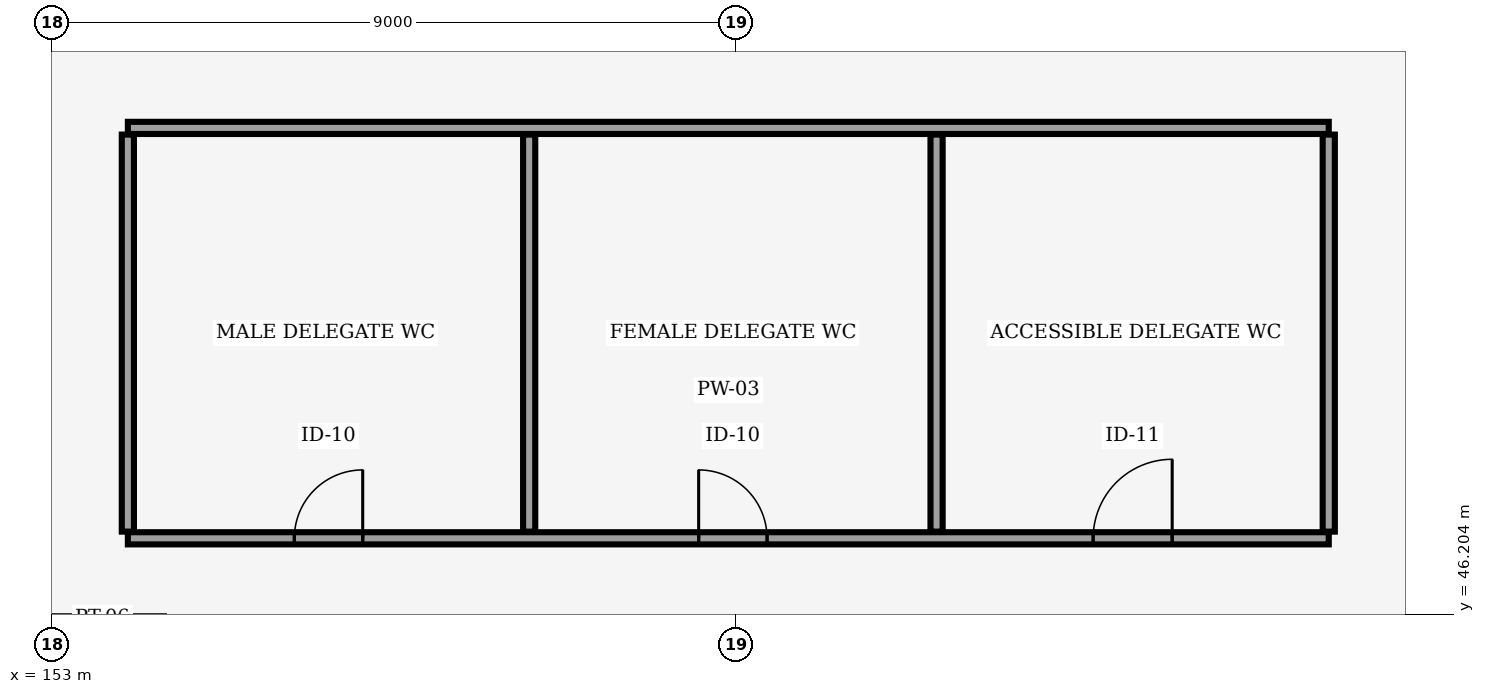
"""IFC4 building model, lengths in metres.
Left out: names, types, materials, properties, quantities, classifications, styles, units other than length and angle.
Written with IfcOpenShell. Run it as: python <this file> out.ifc"""

import sys

from ifc_helpers import new_model, si_unit, direction, frame, frame_2d, origin, place, context, subcontext, project, spatial, rectangle, extrude, element, fill, save


model = new_model("IFC4")
c1 = context("Model", 3, precision=1e-05, world=origin(), true_north=direction((0.0, 1.0)))
c2 = subcontext(c1, "Body", "Model", "MODEL_VIEW")
j1 = project(units=[si_unit("LENGTHUNIT", "METRE"), si_unit("PLANEANGLEUNIT", "RADIAN")], contexts=[c1])
p1 = place(None, origin())
s1 = spatial("IfcSite", under=j1, at=p1, CompositionType="ELEMENT")
p2 = place(p1, origin())
s2 = spatial("IfcBuilding", under=s1, at=p2, CompositionType="ELEMENT")
p3 = place(p2, frame((0.0, 0.0, 6.0)))
s3 = spatial("IfcBuildingStorey", under=s2, at=p3, CompositionType="ELEMENT", Elevation=6.0)
p4 = place(p3, frame((154.0, 47.2, 0.0), z_axis=(0.0, 0.0, 1.0), x_axis=(1.0, 0.0, 0.0)))
e1 = element("IfcWall", 1, at=p4, inside=s3, PredefinedType="PLUMBINGWALL", context=c2, shape_type="SweptSolid", body=[
    extrude(rectangle(XDim=15.8, YDim=0.16, at=frame_2d((7.9, 0.0))), origin(), (0.0, 0.0, 1.0), 4.85),
])
p5 = place(p4, frame((2.19, 0.0, 0.0)))
e2 = element("IfcOpeningElement", 2, at=p5, cuts=e1, PredefinedType="OPENING", context=c2, shape_type="SweptSolid", body=[
    extrude(rectangle(XDim=0.9, YDim=2.1, at=frame_2d((0.45, 1.05))), frame((0.0, 0.09, 0.0), z_axis=(0.0, -1.0, 0.0), x_axis=(1.0, 0.0, 0.0)), (0.0, 0.0, 1.0), 0.18),
])
p6 = place(p4, frame((7.51, 0.0, 0.0)))
e3 = element("IfcOpeningElement", 3, at=p6, cuts=e1, PredefinedType="OPENING", context=c2, shape_type="SweptSolid", body=[
    extrude(rectangle(XDim=0.9, YDim=2.1, at=frame_2d((0.45, 1.05))), frame((0.0, 0.09, 0.0), z_axis=(0.0, -1.0, 0.0), x_axis=(1.0, 0.0, 0.0)), (0.0, 0.0, 1.0), 0.18),
])
p7 = place(p4, frame((12.7, 0.0, 0.0)))
e4 = element("IfcOpeningElement", 4, at=p7, cuts=e1, PredefinedType="OPENING", context=c2, shape_type="SweptSolid", body=[
    extrude(rectangle(XDim=1.04, YDim=2.15, at=frame_2d((0.52, 1.075))), frame((0.0, 0.09, 0.0), z_axis=(0.0, -1.0, 0.0), x_axis=(1.0, 0.0, 0.0)), (0.0, 0.0, 1.0), 0.18),
])
p8 = place(p3, frame((154.0, 52.6, 0.0), z_axis=(0.0, 0.0, 1.0), x_axis=(1.0, 0.0, 0.0)))
e5 = element("IfcWall", 5, at=p8, inside=s3, PredefinedType="PLUMBINGWALL", context=c2, shape_type="SweptSolid", body=[
    extrude(rectangle(XDim=15.8, YDim=0.16, at=frame_2d((7.9, 0.0))), origin(), (0.0, 0.0, 1.0), 4.85),
])
for number, where, z_axis, x_axis in (
    (6, (154.0, 47.288, 0.0), (0.0, 0.0, 1.0), (0.0, 1.0, 0.0)),
    (7, (159.28, 47.288, 0.0), (0.0, 0.0, 1.0), (0.0, 1.0, 0.0)),
    (8, (164.64, 47.288, 0.0), (0.0, 0.0, 1.0), (0.0, 1.0, 0.0)),
    (9, (169.8, 47.288, 0.0), (0.0, 0.0, 1.0), (0.0, 1.0, 0.0)),
):
    element("IfcWall", number, at=place(p3, frame(where, z_axis=z_axis, x_axis=x_axis)), inside=s3, PredefinedType="PLUMBINGWALL", context=c2, shape_type="SweptSolid", body=[
        extrude(rectangle(XDim=5.224, YDim=0.16, at=frame_2d((2.612, 0.0))), origin(), (0.0, 0.0, 1.0), 4.85),
    ])
p9 = place(p5, origin())
e10 = element("IfcDoor", 10, at=p9, inside=s3, OperationType="SINGLE_SWING_RIGHT", PredefinedType="DOOR", context=c2, shape_type="SweptSolid", body=[
    extrude(rectangle(XDim=0.9, YDim=2.1, at=frame_2d((0.45, 1.05))), frame((0.0, 0.025, 0.0), z_axis=(0.0, -1.0, 0.0), x_axis=(1.0, 0.0, 0.0)), (0.0, 0.0, 1.0), 0.05),
])
fill(e2, e10)
p10 = place(p6, origin())
e11 = element("IfcDoor", 11, at=p10, inside=s3, OperationType="SINGLE_SWING_LEFT", PredefinedType="DOOR", context=c2, shape_type="SweptSolid", body=[
    extrude(rectangle(XDim=0.9, YDim=2.1, at=frame_2d((0.45, 1.05))), frame((0.0, 0.025, 0.0), z_axis=(0.0, -1.0, 0.0), x_axis=(1.0, 0.0, 0.0)), (0.0, 0.0, 1.0), 0.05),
])
fill(e3, e11)
p11 = place(p7, origin())
e12 = element("IfcDoor", 12, at=p11, inside=s3, OperationType="SINGLE_SWING_RIGHT", PredefinedType="DOOR", context=c2, shape_type="SweptSolid", body=[
    extrude(rectangle(XDim=1.04, YDim=2.15, at=frame_2d((0.52, 1.075))), frame((0.0, 0.025, 0.0), z_axis=(0.0, -1.0, 0.0), x_axis=(1.0, 0.0, 0.0)), (0.0, 0.0, 1.0), 0.05),
])
fill(e4, e12)
save(model, sys.argv[1])
